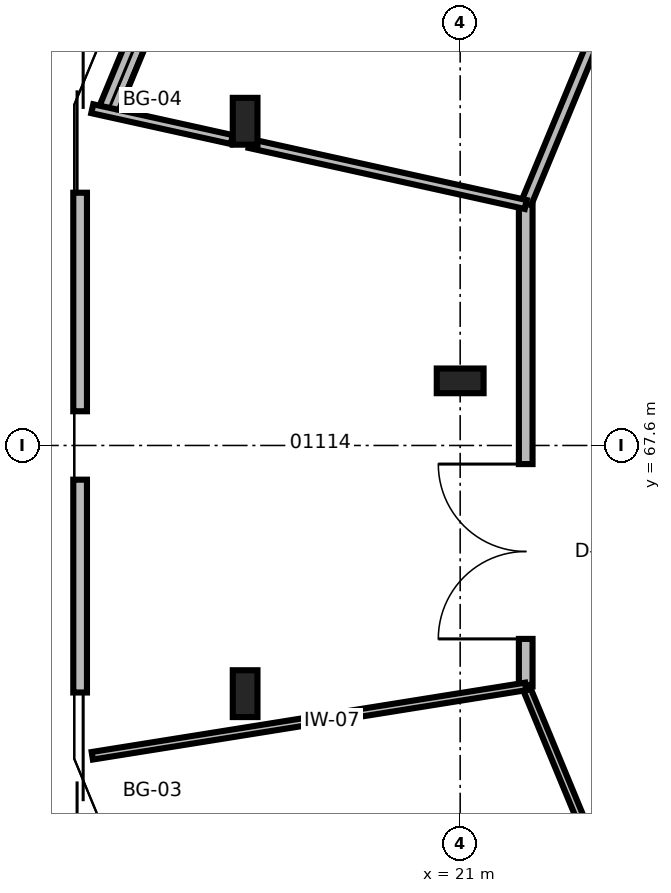
"""IFC4 building model, lengths in metres.
Left out: names, types, materials, properties, quantities, classifications, styles, units other than length and angle.
Written with IfcOpenShell. Run it as: python <this file> out.ifc"""

import sys

from ifc_helpers import new_model, si_unit, direction, frame, frame_2d, origin, origin_2d, place, context, subcontext, project, spatial, rectangle, i_section, extrude, element, fill, save


model = new_model("IFC4")
c1 = context("Model", 3, precision=1e-05, world=origin(), true_north=direction((0.0, 1.0)))
c2 = subcontext(c1, "Body", "Model", "MODEL_VIEW")
j1 = project(units=[si_unit("LENGTHUNIT", "METRE"), si_unit("PLANEANGLEUNIT", "RADIAN")], contexts=[c1])
p1 = place(None, origin())
s1 = spatial("IfcSite", under=j1, at=p1, CompositionType="ELEMENT")
p2 = place(p1, origin())
s2 = spatial("IfcBuilding", under=s1, at=p2, CompositionType="ELEMENT")
p3 = place(p2, frame((0.0, 0.0, 5.1)))
s3 = spatial("IfcBuildingStorey", under=s2, at=p3, CompositionType="ELEMENT", Elevation=5.1)
for number, where, z_axis, x_axis in (
    (1, (18.171, 71.865, 0.0), (0.0, 0.0, 1.0), (1.0, 0.0, 0.0)),
    (2, (18.171, 64.335, 0.0), (0.0, 0.0, 1.0), (1.0, 0.0, 0.0)),
    (3, (21.0, 68.45, 0.0), (0.0, 0.0, 1.0), (0.0, 1.0, 0.0)),
):
    element("IfcColumn", number, at=place(p3, frame(where, z_axis=z_axis, x_axis=x_axis)), inside=s3, PredefinedType="COLUMN", context=c2, shape_type="SweptSolid", body=[
        extrude(i_section(OverallWidth=0.325, OverallDepth=0.616, WebThickness=0.014, FlangeThickness=0.021, at=origin_2d()), origin(), (0.0, 0.0, 1.0), 4.5),
    ])
p4 = place(p3, frame((19.579, 79.753, 0.0), z_axis=(0.0, 0.0, 1.0), x_axis=(-0.382696215843, -0.923874237318, 0.0)))
e4 = element("IfcWall", 4, at=p4, inside=s3, PredefinedType="SOLIDWALL", context=c2, shape_type="SweptSolid", body=[
    extrude(rectangle(XDim=8.368, YDim=0.26, at=frame_2d((4.184, 0.0))), origin(), (0.0, 0.0, 1.0), 1.48),
])
p5 = place(p3, frame((16.0, 67.15, 0.0), z_axis=(0.0, 0.0, 1.0), x_axis=(0.0, -1.0, 0.0)))
e5 = element("IfcWall", 5, at=p5, inside=s3, PredefinedType="PARTITIONING", context=c2, shape_type="SweptSolid", body=[
    extrude(rectangle(XDim=8.2, YDim=0.18, at=frame_2d((4.1, 0.0))), origin(), (0.0, 0.0, 1.0), 3.364),
])
p6 = place(p5, frame((2.8, 0.0, 0.0)))
e6 = element("IfcOpeningElement", 6, at=p6, cuts=e5, PredefinedType="OPENING", context=c2, shape_type="SweptSolid", body=[
    extrude(rectangle(XDim=2.6, YDim=2.5, at=frame_2d((1.3, 1.25))), frame((0.0, 0.1, 0.0), z_axis=(0.0, -1.0, 0.0), x_axis=(1.0, 0.0, 0.0)), (0.0, 0.0, 1.0), 0.2),
])
p7 = place(p3, frame((16.0, 76.25, 0.0), z_axis=(0.0, 0.0, 1.0), x_axis=(0.0, -1.0, 0.0)))
e7 = element("IfcWall", 7, at=p7, inside=s3, PredefinedType="PARTITIONING", context=c2, shape_type="SweptSolid", body=[
    extrude(rectangle(XDim=8.2, YDim=0.18, at=frame_2d((4.1, 0.0))), origin(), (0.0, 0.0, 1.0), 3.364),
])
p8 = place(p7, frame((2.875, 0.0, 0.0)))
e8 = element("IfcOpeningElement", 8, at=p8, cuts=e7, PredefinedType="OPENING", context=c2, shape_type="SweptSolid", body=[
    extrude(rectangle(XDim=2.45, YDim=2.55, at=frame_2d((1.225, 1.275))), frame((0.0, 0.1, 0.0), z_axis=(0.0, -1.0, 0.0), x_axis=(1.0, 0.0, 0.0)), (0.0, 0.0, 1.0), 0.2),
])
p9 = place(p3, frame((24.289, 76.628, 0.0), z_axis=(0.0, 0.0, 1.0), x_axis=(-0.382676004295, -0.923882609284, 0.0)))
e9 = element("IfcWall", 9, at=p9, inside=s3, PredefinedType="PARTITIONING", context=c2, shape_type="SweptSolid", body=[
    extrude(rectangle(XDim=6.34, YDim=0.14, at=frame_2d((3.17, 0.0))), origin(), (0.0, 0.0, 1.0), 3.599),
])
p10 = place(p3, frame((21.862, 70.77, 0.0), z_axis=(0.0, 0.0, 1.0), x_axis=(0.0, -1.0, 0.0)))
e10 = element("IfcWall", 10, at=p10, inside=s3, PredefinedType="PARTITIONING", context=c2, shape_type="SweptSolid", body=[
    extrude(rectangle(XDim=6.341, YDim=0.18, at=frame_2d((3.17, 0.0))), origin(), (0.0, 0.0, 1.0), 3.599),
])
p11 = place(p10, frame((3.415, 0.0, 0.0)))
e11 = element("IfcOpeningElement", 11, at=p11, cuts=e10, PredefinedType="OPENING", context=c2, shape_type="SweptSolid", body=[
    extrude(rectangle(XDim=2.3, YDim=2.45, at=frame_2d((1.15, 1.225))), frame((0.0, 0.1, 0.0), z_axis=(0.0, -1.0, 0.0), x_axis=(1.0, 0.0, 0.0)), (0.0, 0.0, 1.0), 0.2),
])
p12 = place(p3, frame((21.862, 64.43, 0.0), z_axis=(0.0, 0.0, 1.0), x_axis=(0.382676004295, -0.923882609284, 0.0)))
e12 = element("IfcWall", 12, at=p12, inside=s3, PredefinedType="PARTITIONING", context=c2, shape_type="SweptSolid", body=[
    extrude(rectangle(XDim=6.34, YDim=0.1, at=frame_2d((3.17, 0.0))), origin(), (0.0, 0.0, 1.0), 3.599),
])
p13 = place(p3, frame((21.862, 70.77, 0.0), z_axis=(0.0, 0.0, 1.0), x_axis=(-0.976448814261, 0.215749190329, 0.0)))
e13 = element("IfcWall", 13, at=p13, inside=s3, PredefinedType="PARTITIONING", context=c2, shape_type="SweptSolid", body=[
    extrude(rectangle(XDim=3.721, YDim=0.12, at=frame_2d((1.86, 0.0))), origin(), (0.0, 0.0, 1.0), 3.599),
])
p14 = place(p3, frame((17.995, 71.625, 0.0), z_axis=(0.0, 0.0, 1.0), x_axis=(-0.976452202899, 0.215733853287, 0.0)))
e14 = element("IfcWall", 14, at=p14, inside=s3, PredefinedType="PARTITIONING", context=c2, shape_type="SweptSolid", body=[
    extrude(rectangle(XDim=1.88, YDim=0.12, at=frame_2d((0.94, 0.0))), origin(), (0.0, 0.0, 1.0), 4.2),
])
p15 = place(p3, frame((21.862, 64.43, 0.0), z_axis=(0.0, 0.0, 1.0), x_axis=(-0.987448017652, -0.157944333345, 0.0)))
e15 = element("IfcWall", 15, at=p15, inside=s3, PredefinedType="PARTITIONING", context=c2, shape_type="SweptSolid", body=[
    extrude(rectangle(XDim=5.775, YDim=0.1, at=frame_2d((2.887, 0.0))), origin(), (0.0, 0.0, 1.0), 3.599),
])
p16 = place(p6, origin())
e16 = element("IfcDoor", 16, at=p16, inside=s3, OperationType="DOUBLE_DOOR_SLIDING", PredefinedType="GATE", context=c2, shape_type="SweptSolid", body=[
    extrude(rectangle(XDim=2.6, YDim=2.5, at=frame_2d((1.3, 1.25))), frame((0.0, 0.025, 0.0), z_axis=(0.0, -1.0, 0.0), x_axis=(1.0, 0.0, 0.0)), (0.0, 0.0, 1.0), 0.05),
])
fill(e6, e16)
p17 = place(p8, origin())
e17 = element("IfcDoor", 17, at=p17, inside=s3, OperationType="DOUBLE_DOOR_SLIDING", PredefinedType="GATE", context=c2, shape_type="SweptSolid", body=[
    extrude(rectangle(XDim=2.45, YDim=2.55, at=frame_2d((1.225, 1.275))), frame((0.0, 0.025, 0.0), z_axis=(0.0, -1.0, 0.0), x_axis=(1.0, 0.0, 0.0)), (0.0, 0.0, 1.0), 0.05),
])
fill(e8, e17)
p18 = place(p11, frame((2.3, 0.0, 0.0), z_axis=(0.0, 0.0, 1.0), x_axis=(-1.0, 0.0, 0.0)))
e18 = element("IfcDoor", 18, at=p18, inside=s3, OperationType="DOUBLE_DOOR_SINGLE_SWING", PredefinedType="DOOR", context=c2, shape_type="SweptSolid", body=[
    extrude(rectangle(XDim=2.3, YDim=2.45, at=frame_2d((1.15, 1.225))), frame((0.0, 0.025, 0.0), z_axis=(0.0, -1.0, 0.0), x_axis=(1.0, 0.0, 0.0)), (0.0, 0.0, 1.0), 0.05),
])
fill(e11, e18)
save(model, sys.argv[1])
